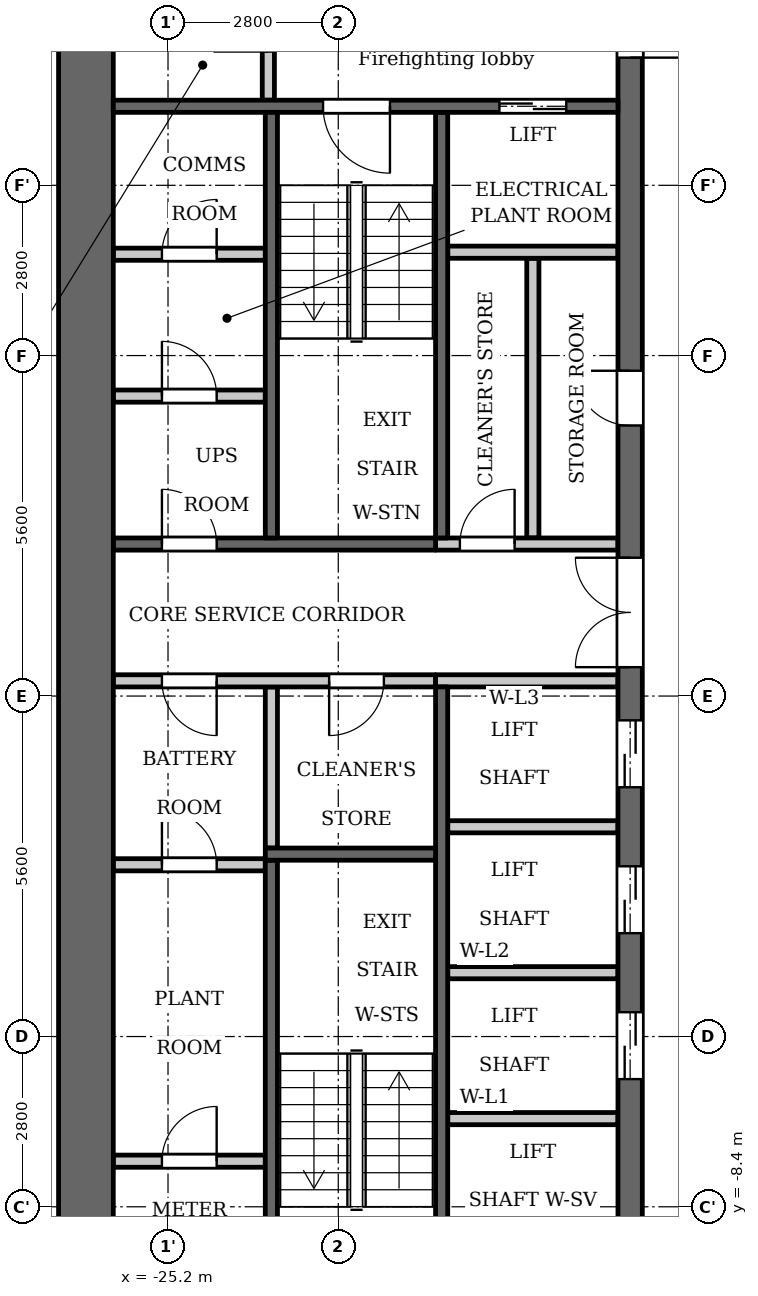
"""IFC4 building model, lengths in metres.
Left out: names, types, materials, properties, quantities, classifications, styles, units other than length and angle.
Written with IfcOpenShell. Run it as: python <this file> out.ifc"""

import sys

from ifc_helpers import new_model, si_unit, direction, frame, frame_2d, origin, place, context, subcontext, project, spatial, rectangle, extrude, element, fill, save


model = new_model("IFC4")
c1 = context("Model", 3, precision=1e-05, world=origin(), true_north=direction((0.0, 1.0)))
c2 = subcontext(c1, "Body", "Model", "MODEL_VIEW")
j1 = project(units=[si_unit("LENGTHUNIT", "METRE"), si_unit("PLANEANGLEUNIT", "RADIAN")], contexts=[c1])
p1 = place(None, origin())
s1 = spatial("IfcSite", under=j1, at=p1, CompositionType="ELEMENT")
p2 = place(p1, origin())
s2 = spatial("IfcBuilding", under=s1, at=p2, CompositionType="ELEMENT")
p3 = place(p2, frame((0.0, 0.0, 86.8)))
s3 = spatial("IfcBuildingStorey", under=s2, at=p3, CompositionType="ELEMENT", Elevation=86.8)
p4 = place(p3, frame((-23.5, -2.5, 0.0), z_axis=(0.0, 0.0, 1.0), x_axis=(0.0, 1.0, 0.0)))
e1 = element("IfcWall", 1, at=p4, inside=s3, PredefinedType="PARTITIONING", context=c2, shape_type="SweptSolid", body=[
    extrude(rectangle(XDim=2.65, YDim=0.2, at=frame_2d((1.325, 0.0))), origin(), (0.0, 0.0, 1.0), 3.2),
])
p5 = place(p3, frame((-20.7, 2.6, 0.0), z_axis=(0.0, 0.0, 1.0), x_axis=(0.0, 1.0, 0.0)))
e2 = element("IfcWall", 2, at=p5, inside=s3, PredefinedType="SHEAR", context=c2, shape_type="SweptSolid", body=[
    extrude(rectangle(XDim=7.0, YDim=0.2, at=frame_2d((3.5, 0.0))), origin(), (0.0, 0.0, 1.0), 3.2),
])
p6 = place(p3, frame((-20.7, -9.6, 0.0), z_axis=(0.0, 0.0, 1.0), x_axis=(0.0, 1.0, 0.0)))
e3 = element("IfcWall", 3, at=p6, inside=s3, PredefinedType="SHEAR", context=c2, shape_type="SweptSolid", body=[
    extrude(rectangle(XDim=9.75, YDim=0.2, at=frame_2d((4.875, 0.0))), origin(), (0.0, 0.0, 1.0), 3.2),
])
p7 = place(p3, frame((-20.8, 2.5, 0.0), z_axis=(0.0, 0.0, 1.0), x_axis=(-1.0, 0.0, 0.0)))
e4 = element("IfcWall", 4, at=p7, inside=s3, PredefinedType="SHEAR", context=c2, shape_type="SweptSolid", body=[
    extrude(rectangle(XDim=5.3, YDim=0.2, at=frame_2d((2.65, 0.0))), origin(), (0.0, 0.0, 1.0), 3.2),
])
p8 = place(p7, frame((3.6, 0.0, 0.0)))
e5 = element("IfcOpeningElement", 5, at=p8, cuts=e4, PredefinedType="OPENING", context=c2, shape_type="SweptSolid", body=[
    extrude(rectangle(XDim=0.9, YDim=2.1, at=frame_2d((0.45, 1.05))), frame((0.0, 0.11, 0.0), z_axis=(0.0, -1.0, 0.0), x_axis=(1.0, 0.0, 0.0)), (0.0, 0.0, 1.0), 0.22),
])
p9 = place(p3, frame((-20.8, 0.25, 0.0), z_axis=(0.0, 0.0, 1.0), x_axis=(-1.0, 0.0, 0.0)))
e6 = element("IfcWall", 6, at=p9, inside=s3, PredefinedType="PARTITIONING", context=c2, shape_type="SweptSolid", body=[
    extrude(rectangle(XDim=5.3, YDim=0.2, at=frame_2d((2.65, 0.0))), origin(), (0.0, 0.0, 1.0), 3.2),
])
p10 = place(p9, frame((0.85, 0.0, 0.0)))
e7 = element("IfcOpeningElement", 7, at=p10, cuts=e6, PredefinedType="OPENING", context=c2, shape_type="SweptSolid", body=[
    extrude(rectangle(XDim=0.9, YDim=2.1, at=frame_2d((0.45, 1.05))), frame((0.0, 0.11, 0.0), z_axis=(0.0, -1.0, 0.0), x_axis=(1.0, 0.0, 0.0)), (0.0, 0.0, 1.0), 0.22),
])
p11 = place(p9, frame((3.6, 0.0, 0.0)))
e8 = element("IfcOpeningElement", 8, at=p11, cuts=e6, PredefinedType="OPENING", context=c2, shape_type="SweptSolid", body=[
    extrude(rectangle(XDim=0.9, YDim=2.1, at=frame_2d((0.45, 1.05))), frame((0.0, 0.11, 0.0), z_axis=(0.0, -1.0, 0.0), x_axis=(1.0, 0.0, 0.0)), (0.0, 0.0, 1.0), 0.22),
])
p12 = place(p3, frame((-19.2, 2.6, 0.0), z_axis=(0.0, 0.0, 1.0), x_axis=(0.0, 1.0, 0.0)))
e9 = element("IfcWall", 9, at=p12, inside=s3, PredefinedType="PARTITIONING", context=c2, shape_type="SweptSolid", body=[
    extrude(rectangle(XDim=4.6, YDim=0.2, at=frame_2d((2.3, 0.0))), origin(), (0.0, 0.0, 1.0), 3.2),
])
p13 = place(p3, frame((-17.6, -12.3, 0.0), z_axis=(0.0, 0.0, 1.0), x_axis=(0.0, 1.0, 0.0)))
e10 = element("IfcWall", 10, at=p13, inside=s3, PredefinedType="SHEAR", context=c2, shape_type="SweptSolid", body=[
    extrude(rectangle(XDim=24.6, YDim=0.4, at=frame_2d((12.3, 0.0))), origin(), (0.0, 0.0, 1.0), 3.2),
])
p14 = place(p13, frame((6.0, 0.0, 0.0)))
e11 = element("IfcOpeningElement", 11, at=p14, cuts=e10, PredefinedType="OPENING", context=c2, shape_type="SweptSolid", body=[
    extrude(rectangle(XDim=1.1, YDim=2.1, at=frame_2d((0.55, 1.05))), frame((0.0, 0.21, 0.0), z_axis=(0.0, -1.0, 0.0), x_axis=(1.0, 0.0, 0.0)), (0.0, 0.0, 1.0), 0.42),
])
p15 = place(p13, frame((8.4, 0.0, 0.0)))
e12 = element("IfcOpeningElement", 12, at=p15, cuts=e10, PredefinedType="OPENING", context=c2, shape_type="SweptSolid", body=[
    extrude(rectangle(XDim=1.1, YDim=2.1, at=frame_2d((0.55, 1.05))), frame((0.0, 0.21, 0.0), z_axis=(0.0, -1.0, 0.0), x_axis=(1.0, 0.0, 0.0)), (0.0, 0.0, 1.0), 0.42),
])
p16 = place(p13, frame((10.8, 0.0, 0.0)))
e13 = element("IfcOpeningElement", 13, at=p16, cuts=e10, PredefinedType="OPENING", context=c2, shape_type="SweptSolid", body=[
    extrude(rectangle(XDim=1.1, YDim=2.1, at=frame_2d((0.55, 1.05))), frame((0.0, 0.21, 0.0), z_axis=(0.0, -1.0, 0.0), x_axis=(1.0, 0.0, 0.0)), (0.0, 0.0, 1.0), 0.42),
])
p17 = place(p13, frame((16.75, 0.0, 0.0)))
e14 = element("IfcOpeningElement", 14, at=p17, cuts=e10, PredefinedType="OPENING", context=c2, shape_type="SweptSolid", body=[
    extrude(rectangle(XDim=0.9, YDim=2.1, at=frame_2d((0.45, 1.05))), frame((0.0, 0.21, 0.0), z_axis=(0.0, -1.0, 0.0), x_axis=(1.0, 0.0, 0.0)), (0.0, 0.0, 1.0), 0.42),
])
p18 = place(p13, frame((22.8, 0.0, 0.0)))
e15 = element("IfcOpeningElement", 15, at=p18, cuts=e10, PredefinedType="OPENING", context=c2, shape_type="SweptSolid", body=[
    extrude(rectangle(XDim=1.1, YDim=2.1, at=frame_2d((0.55, 1.05))), frame((0.0, 0.21, 0.0), z_axis=(0.0, -1.0, 0.0), x_axis=(1.0, 0.0, 0.0)), (0.0, 0.0, 1.0), 0.42),
])
p19 = place(p13, frame((0.7, 0.0, 0.0)))
e16 = element("IfcOpeningElement", 16, at=p19, cuts=e10, PredefinedType="OPENING", context=c2, shape_type="SweptSolid", body=[
    extrude(rectangle(XDim=1.1, YDim=2.1, at=frame_2d((0.55, 1.05))), frame((0.0, 0.21, 0.0), z_axis=(0.0, -1.0, 0.0), x_axis=(1.0, 0.0, 0.0)), (0.0, 0.0, 1.0), 0.42),
])
p20 = place(p13, frame((12.775, 0.0, 0.0)))
e17 = element("IfcOpeningElement", 17, at=p20, cuts=e10, PredefinedType="OPENING", context=c2, shape_type="SweptSolid", body=[
    extrude(rectangle(XDim=1.8, YDim=2.1, at=frame_2d((0.9, 1.05))), frame((0.0, 0.21, 0.0), z_axis=(0.0, -1.0, 0.0), x_axis=(1.0, 0.0, 0.0)), (0.0, 0.0, 1.0), 0.42),
])
p21 = place(p3, frame((-26.55, -12.3, 0.0), z_axis=(0.0, 0.0, 1.0), x_axis=(0.0, 1.0, 0.0)))
e18 = element("IfcWall", 18, at=p21, inside=s3, PredefinedType="SHEAR", context=c2, shape_type="SweptSolid", body=[
    extrude(rectangle(XDim=24.6, YDim=0.9, at=frame_2d((12.3, 0.0))), origin(), (0.0, 0.0, 1.0), 3.2),
])
p22 = place(p3, frame((-23.55, 9.8, 0.0), z_axis=(0.0, 0.0, 1.0), x_axis=(0.0, 1.0, 0.0)))
e19 = element("IfcWall", 19, at=p22, inside=s3, PredefinedType="PARTITIONING", context=c2, shape_type="SweptSolid", body=[
    extrude(rectangle(XDim=2.5, YDim=0.2, at=frame_2d((1.25, 0.0))), origin(), (0.0, 0.0, 1.0), 3.2),
])
p23 = place(p22, frame((0.8, 0.0, 0.0)))
e20 = element("IfcOpeningElement", 20, at=p23, cuts=e19, PredefinedType="OPENING", context=c2, shape_type="SweptSolid", body=[
    extrude(rectangle(XDim=0.9, YDim=2.1, at=frame_2d((0.45, 1.05))), frame((0.0, 0.11, 0.0), z_axis=(0.0, -1.0, 0.0), x_axis=(1.0, 0.0, 0.0)), (0.0, 0.0, 1.0), 0.22),
])
p24 = place(p3, frame((-23.6, -7.65, 0.0), z_axis=(0.0, 0.0, 1.0), x_axis=(-1.0, 0.0, 0.0)))
e21 = element("IfcWall", 21, at=p24, inside=s3, PredefinedType="PARTITIONING", context=c2, shape_type="SweptSolid", body=[
    extrude(rectangle(XDim=2.5, YDim=0.2, at=frame_2d((1.25, 0.0))), origin(), (0.0, 0.0, 1.0), 3.2),
])
p25 = place(p24, frame((0.8, 0.0, 0.0)))
e22 = element("IfcOpeningElement", 22, at=p25, cuts=e21, PredefinedType="OPENING", context=c2, shape_type="SweptSolid", body=[
    extrude(rectangle(XDim=0.9, YDim=2.1, at=frame_2d((0.45, 1.05))), frame((0.0, 0.11, 0.0), z_axis=(0.0, -1.0, 0.0), x_axis=(1.0, 0.0, 0.0)), (0.0, 0.0, 1.0), 0.22),
])
p26 = place(p3, frame((-23.6, -2.775, 0.0), z_axis=(0.0, 0.0, 1.0), x_axis=(-1.0, 0.0, 0.0)))
e23 = element("IfcWall", 23, at=p26, inside=s3, PredefinedType="PARTITIONING", context=c2, shape_type="SweptSolid", body=[
    extrude(rectangle(XDim=2.5, YDim=0.2, at=frame_2d((1.25, 0.0))), origin(), (0.0, 0.0, 1.0), 3.2),
])
p27 = place(p26, frame((0.8, 0.0, 0.0)))
e24 = element("IfcOpeningElement", 24, at=p27, cuts=e23, PredefinedType="OPENING", context=c2, shape_type="SweptSolid", body=[
    extrude(rectangle(XDim=0.9, YDim=2.1, at=frame_2d((0.45, 1.05))), frame((0.0, 0.11, 0.0), z_axis=(0.0, -1.0, 0.0), x_axis=(1.0, 0.0, 0.0)), (0.0, 0.0, 1.0), 0.22),
])
p28 = place(p3, frame((-23.6, 4.933, 0.0), z_axis=(0.0, 0.0, 1.0), x_axis=(-1.0, 0.0, 0.0)))
e25 = element("IfcWall", 25, at=p28, inside=s3, PredefinedType="PARTITIONING", context=c2, shape_type="SweptSolid", body=[
    extrude(rectangle(XDim=2.5, YDim=0.2, at=frame_2d((1.25, 0.0))), origin(), (0.0, 0.0, 1.0), 3.2),
])
p29 = place(p28, frame((0.8, 0.0, 0.0)))
e26 = element("IfcOpeningElement", 26, at=p29, cuts=e25, PredefinedType="OPENING", context=c2, shape_type="SweptSolid", body=[
    extrude(rectangle(XDim=0.9, YDim=2.1, at=frame_2d((0.45, 1.05))), frame((0.0, 0.11, 0.0), z_axis=(0.0, -1.0, 0.0), x_axis=(1.0, 0.0, 0.0)), (0.0, 0.0, 1.0), 0.22),
])
p30 = place(p3, frame((-23.6, 7.267, 0.0), z_axis=(0.0, 0.0, 1.0), x_axis=(-1.0, 0.0, 0.0)))
e27 = element("IfcWall", 27, at=p30, inside=s3, PredefinedType="PARTITIONING", context=c2, shape_type="SweptSolid", body=[
    extrude(rectangle(XDim=2.5, YDim=0.2, at=frame_2d((1.25, 0.0))), origin(), (0.0, 0.0, 1.0), 3.2),
])
p31 = place(p30, frame((0.8, 0.0, 0.0)))
e28 = element("IfcOpeningElement", 28, at=p31, cuts=e27, PredefinedType="OPENING", context=c2, shape_type="SweptSolid", body=[
    extrude(rectangle(XDim=0.9, YDim=2.1, at=frame_2d((0.45, 1.05))), frame((0.0, 0.11, 0.0), z_axis=(0.0, -1.0, 0.0), x_axis=(1.0, 0.0, 0.0)), (0.0, 0.0, 1.0), 0.22),
])
for number, where, z_axis, x_axis in (
    (29, (-17.8, -6.95, 0.0), (0.0, 0.0, 1.0), (-1.0, 0.0, 0.0)),
    (30, (-17.8, -4.55, 0.0), (0.0, 0.0, 1.0), (-1.0, 0.0, 0.0)),
    (31, (-17.8, -2.15, 0.0), (0.0, 0.0, 1.0), (-1.0, 0.0, 0.0)),
):
    element("IfcWall", number, at=place(p3, frame(where, z_axis=z_axis, x_axis=x_axis)), inside=s3, PredefinedType="PARTITIONING", context=c2, shape_type="SweptSolid", body=[
        extrude(rectangle(XDim=2.8, YDim=0.2, at=frame_2d((1.4, 0.0))), origin(), (0.0, 0.0, 1.0), 3.2),
    ])
p32 = place(p3, frame((-17.8, 0.25, 0.0), z_axis=(0.0, 0.0, 1.0), x_axis=(-1.0, 0.0, 0.0)))
e32 = element("IfcWall", 32, at=p32, inside=s3, PredefinedType="PARTITIONING", context=c2, shape_type="SweptSolid", body=[
    extrude(rectangle(XDim=3.0, YDim=0.2, at=frame_2d((1.5, 0.0))), origin(), (0.0, 0.0, 1.0), 3.2),
])
p33 = place(p3, frame((-17.8, 2.5, 0.0), z_axis=(0.0, 0.0, 1.0), x_axis=(-1.0, 0.0, 0.0)))
e33 = element("IfcWall", 33, at=p33, inside=s3, PredefinedType="PARTITIONING", context=c2, shape_type="SweptSolid", body=[
    extrude(rectangle(XDim=3.0, YDim=0.2, at=frame_2d((1.5, 0.0))), origin(), (0.0, 0.0, 1.0), 3.2),
])
p34 = place(p33, frame((1.7, 0.0, 0.0)))
e34 = element("IfcOpeningElement", 34, at=p34, cuts=e33, PredefinedType="OPENING", context=c2, shape_type="SweptSolid", body=[
    extrude(rectangle(XDim=0.9, YDim=2.1, at=frame_2d((0.45, 1.05))), frame((0.0, 0.11, 0.0), z_axis=(0.0, -1.0, 0.0), x_axis=(1.0, 0.0, 0.0)), (0.0, 0.0, 1.0), 0.22),
])
p35 = place(p3, frame((-17.8, 7.3, 0.0), z_axis=(0.0, 0.0, 1.0), x_axis=(-1.0, 0.0, 0.0)))
e35 = element("IfcWall", 35, at=p35, inside=s3, PredefinedType="PARTITIONING", context=c2, shape_type="SweptSolid", body=[
    extrude(rectangle(XDim=2.8, YDim=0.2, at=frame_2d((1.4, 0.0))), origin(), (0.0, 0.0, 1.0), 3.2),
])
p36 = place(p3, frame((-17.8, 9.7, 0.0), z_axis=(0.0, 0.0, 1.0), x_axis=(-1.0, 0.0, 0.0)))
e36 = element("IfcWall", 36, at=p36, inside=s3, PredefinedType="SHEAR", context=c2, shape_type="SweptSolid", body=[
    extrude(rectangle(XDim=8.3, YDim=0.2, at=frame_2d((4.15, 0.0))), origin(), (0.0, 0.0, 1.0), 3.2),
])
p37 = place(p36, frame((0.85, 0.0, 0.0)))
e37 = element("IfcOpeningElement", 37, at=p37, cuts=e36, PredefinedType="OPENING", context=c2, shape_type="SweptSolid", body=[
    extrude(rectangle(XDim=1.1, YDim=2.1, at=frame_2d((0.55, 1.05))), frame((0.0, 0.11, 0.0), z_axis=(0.0, -1.0, 0.0), x_axis=(1.0, 0.0, 0.0)), (0.0, 0.0, 1.0), 0.22),
])
p38 = place(p36, frame((3.75, 0.0, 0.0)))
e38 = element("IfcOpeningElement", 38, at=p38, cuts=e36, PredefinedType="OPENING", context=c2, shape_type="SweptSolid", body=[
    extrude(rectangle(XDim=1.1, YDim=2.1, at=frame_2d((0.55, 1.05))), frame((0.0, 0.11, 0.0), z_axis=(0.0, -1.0, 0.0), x_axis=(1.0, 0.0, 0.0)), (0.0, 0.0, 1.0), 0.22),
])
p39 = place(p3, frame((-23.5, 2.6, 0.0), z_axis=(0.0, 0.0, 1.0), x_axis=(0.0, 1.0, 0.0)))
e39 = element("IfcWall", 39, at=p39, inside=s3, PredefinedType="SHEAR", context=c2, shape_type="SweptSolid", body=[
    extrude(rectangle(XDim=7.0, YDim=0.2, at=frame_2d((3.5, 0.0))), origin(), (0.0, 0.0, 1.0), 3.2),
])
p40 = place(p3, frame((-23.5, -9.6, 0.0), z_axis=(0.0, 0.0, 1.0), x_axis=(0.0, 1.0, 0.0)))
e40 = element("IfcWall", 40, at=p40, inside=s3, PredefinedType="SHEAR", context=c2, shape_type="SweptSolid", body=[
    extrude(rectangle(XDim=6.9, YDim=0.2, at=frame_2d((3.45, 0.0))), origin(), (0.0, 0.0, 1.0), 3.2),
])
p41 = place(p3, frame((-20.8, -2.6, 0.0), z_axis=(0.0, 0.0, 1.0), x_axis=(-1.0, 0.0, 0.0)))
e41 = element("IfcWall", 41, at=p41, inside=s3, PredefinedType="SHEAR", context=c2, shape_type="SweptSolid", body=[
    extrude(rectangle(XDim=2.8, YDim=0.2, at=frame_2d((1.4, 0.0))), origin(), (0.0, 0.0, 1.0), 3.2),
])
p42 = place(p14, origin())
e42 = element("IfcDoor", 42, at=p42, inside=s3, OperationType="DOUBLE_DOOR_SLIDING", PredefinedType="DOOR", context=c2, shape_type="SweptSolid", body=[
    extrude(rectangle(XDim=1.1, YDim=2.1, at=frame_2d((0.55, 1.05))), frame((0.0, 0.025, 0.0), z_axis=(0.0, -1.0, 0.0), x_axis=(1.0, 0.0, 0.0)), (0.0, 0.0, 1.0), 0.05),
])
fill(e11, e42)
p43 = place(p15, origin())
e43 = element("IfcDoor", 43, at=p43, inside=s3, OperationType="DOUBLE_DOOR_SLIDING", PredefinedType="DOOR", context=c2, shape_type="SweptSolid", body=[
    extrude(rectangle(XDim=1.1, YDim=2.1, at=frame_2d((0.55, 1.05))), frame((0.0, 0.025, 0.0), z_axis=(0.0, -1.0, 0.0), x_axis=(1.0, 0.0, 0.0)), (0.0, 0.0, 1.0), 0.05),
])
fill(e12, e43)
p44 = place(p16, origin())
e44 = element("IfcDoor", 44, at=p44, inside=s3, OperationType="DOUBLE_DOOR_SLIDING", PredefinedType="DOOR", context=c2, shape_type="SweptSolid", body=[
    extrude(rectangle(XDim=1.1, YDim=2.1, at=frame_2d((0.55, 1.05))), frame((0.0, 0.025, 0.0), z_axis=(0.0, -1.0, 0.0), x_axis=(1.0, 0.0, 0.0)), (0.0, 0.0, 1.0), 0.05),
])
fill(e13, e44)
p45 = place(p17, origin())
e45 = element("IfcDoor", 45, at=p45, inside=s3, OperationType="SINGLE_SWING_LEFT", PredefinedType="DOOR", context=c2, shape_type="SweptSolid", body=[
    extrude(rectangle(XDim=0.9, YDim=2.1, at=frame_2d((0.45, 1.05))), frame((0.0, 0.025, 0.0), z_axis=(0.0, -1.0, 0.0), x_axis=(1.0, 0.0, 0.0)), (0.0, 0.0, 1.0), 0.05),
])
fill(e14, e45)
p46 = place(p34, origin())
e46 = element("IfcDoor", 46, at=p46, inside=s3, OperationType="SINGLE_SWING_LEFT", PredefinedType="DOOR", context=c2, shape_type="SweptSolid", body=[
    extrude(rectangle(XDim=0.9, YDim=2.1, at=frame_2d((0.45, 1.05))), frame((0.0, 0.025, 0.0), z_axis=(0.0, -1.0, 0.0), x_axis=(1.0, 0.0, 0.0)), (0.0, 0.0, 1.0), 0.05),
])
fill(e34, e46)
p47 = place(p37, origin())
e47 = element("IfcDoor", 47, at=p47, inside=s3, OperationType="DOUBLE_DOOR_SLIDING", PredefinedType="DOOR", context=c2, shape_type="SweptSolid", body=[
    extrude(rectangle(XDim=1.1, YDim=2.1, at=frame_2d((0.55, 1.05))), frame((0.0, 0.025, 0.0), z_axis=(0.0, -1.0, 0.0), x_axis=(1.0, 0.0, 0.0)), (0.0, 0.0, 1.0), 0.05),
])
fill(e37, e47)
p48 = place(p18, origin())
e48 = element("IfcDoor", 48, at=p48, inside=s3, OperationType="SINGLE_SWING_LEFT", PredefinedType="DOOR", context=c2, shape_type="SweptSolid", body=[
    extrude(rectangle(XDim=1.1, YDim=2.1, at=frame_2d((0.55, 1.05))), frame((0.0, 0.025, 0.0), z_axis=(0.0, -1.0, 0.0), x_axis=(1.0, 0.0, 0.0)), (0.0, 0.0, 1.0), 0.05),
])
fill(e15, e48)
p49 = place(p38, origin())
e49 = element("IfcDoor", 49, at=p49, inside=s3, OperationType="SINGLE_SWING_RIGHT", PredefinedType="DOOR", context=c2, shape_type="SweptSolid", body=[
    extrude(rectangle(XDim=1.1, YDim=2.1, at=frame_2d((0.55, 1.05))), frame((0.0, 0.025, 0.0), z_axis=(0.0, -1.0, 0.0), x_axis=(1.0, 0.0, 0.0)), (0.0, 0.0, 1.0), 0.05),
])
fill(e38, e49)
p50 = place(p20, origin())
e50 = element("IfcDoor", 50, at=p50, inside=s3, OperationType="DOUBLE_DOOR_SINGLE_SWING", PredefinedType="DOOR", context=c2, shape_type="SweptSolid", body=[
    extrude(rectangle(XDim=1.8, YDim=2.1, at=frame_2d((0.9, 1.05))), frame((0.0, 0.025, 0.0), z_axis=(0.0, -1.0, 0.0), x_axis=(1.0, 0.0, 0.0)), (0.0, 0.0, 1.0), 0.05),
])
fill(e17, e50)
p51 = place(p10, origin())
e51 = element("IfcDoor", 51, at=p51, inside=s3, OperationType="SINGLE_SWING_LEFT", PredefinedType="DOOR", context=c2, shape_type="SweptSolid", body=[
    extrude(rectangle(XDim=0.9, YDim=2.1, at=frame_2d((0.45, 1.05))), frame((0.0, 0.025, 0.0), z_axis=(0.0, -1.0, 0.0), x_axis=(1.0, 0.0, 0.0)), (0.0, 0.0, 1.0), 0.05),
])
fill(e7, e51)
p52 = place(p25, origin())
e52 = element("IfcDoor", 52, at=p52, inside=s3, OperationType="SINGLE_SWING_LEFT", PredefinedType="DOOR", context=c2, shape_type="SweptSolid", body=[
    extrude(rectangle(XDim=0.9, YDim=2.1, at=frame_2d((0.45, 1.05))), frame((0.0, 0.025, 0.0), z_axis=(0.0, -1.0, 0.0), x_axis=(1.0, 0.0, 0.0)), (0.0, 0.0, 1.0), 0.05),
])
fill(e22, e52)
p53 = place(p27, origin())
e53 = element("IfcDoor", 53, at=p53, inside=s3, OperationType="SINGLE_SWING_RIGHT", PredefinedType="DOOR", context=c2, shape_type="SweptSolid", body=[
    extrude(rectangle(XDim=0.9, YDim=2.1, at=frame_2d((0.45, 1.05))), frame((0.0, 0.025, 0.0), z_axis=(0.0, -1.0, 0.0), x_axis=(1.0, 0.0, 0.0)), (0.0, 0.0, 1.0), 0.05),
])
fill(e24, e53)
p54 = place(p11, origin())
e54 = element("IfcDoor", 54, at=p54, inside=s3, OperationType="SINGLE_SWING_RIGHT", PredefinedType="DOOR", context=c2, shape_type="SweptSolid", body=[
    extrude(rectangle(XDim=0.9, YDim=2.1, at=frame_2d((0.45, 1.05))), frame((0.0, 0.025, 0.0), z_axis=(0.0, -1.0, 0.0), x_axis=(1.0, 0.0, 0.0)), (0.0, 0.0, 1.0), 0.05),
])
fill(e8, e54)
p55 = place(p29, origin())
e55 = element("IfcDoor", 55, at=p55, inside=s3, OperationType="SINGLE_SWING_RIGHT", PredefinedType="DOOR", context=c2, shape_type="SweptSolid", body=[
    extrude(rectangle(XDim=0.9, YDim=2.1, at=frame_2d((0.45, 1.05))), frame((0.0, 0.025, 0.0), z_axis=(0.0, -1.0, 0.0), x_axis=(1.0, 0.0, 0.0)), (0.0, 0.0, 1.0), 0.05),
])
fill(e26, e55)
p56 = place(p31, origin())
e56 = element("IfcDoor", 56, at=p56, inside=s3, OperationType="SINGLE_SWING_LEFT", PredefinedType="DOOR", context=c2, shape_type="SweptSolid", body=[
    extrude(rectangle(XDim=0.9, YDim=2.1, at=frame_2d((0.45, 1.05))), frame((0.0, 0.025, 0.0), z_axis=(0.0, -1.0, 0.0), x_axis=(1.0, 0.0, 0.0)), (0.0, 0.0, 1.0), 0.05),
])
fill(e28, e56)
p57 = place(p8, origin())
e57 = element("IfcDoor", 57, at=p57, inside=s3, OperationType="SINGLE_SWING_RIGHT", PredefinedType="DOOR", context=c2, shape_type="SweptSolid", body=[
    extrude(rectangle(XDim=0.9, YDim=2.1, at=frame_2d((0.45, 1.05))), frame((0.0, 0.025, 0.0), z_axis=(0.0, -1.0, 0.0), x_axis=(1.0, 0.0, 0.0)), (0.0, 0.0, 1.0), 0.05),
])
fill(e5, e57)
save(model, sys.argv[1])
